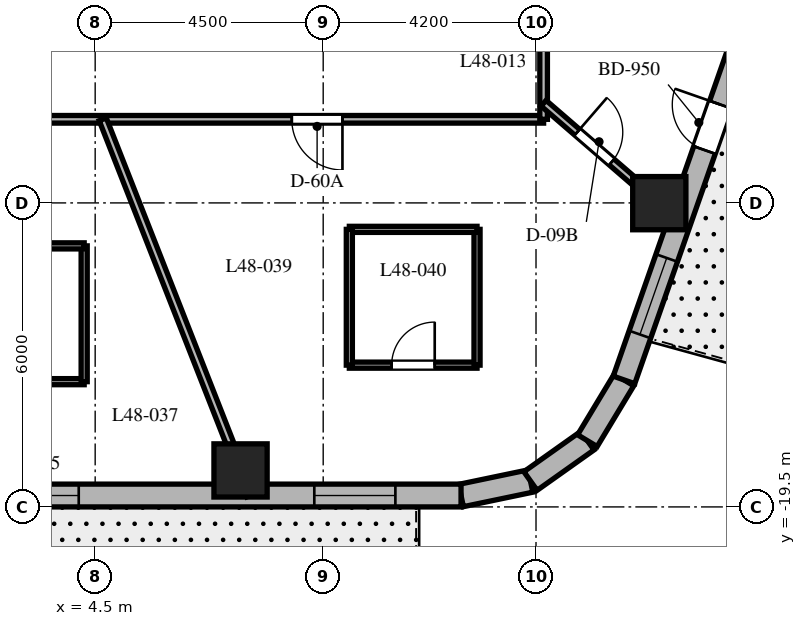
"""IFC4 building model, lengths in metres.
Left out: names, types, materials, properties, quantities, classifications, styles, units other than length and angle.
Written with IfcOpenShell. Run it as: python <this file> out.ifc"""

import sys

from ifc_helpers import new_model, si_unit, direction, frame, frame_2d, origin, origin_2d, place, context, subcontext, project, spatial, rectangle, extrude, element, fill, save


model = new_model("IFC4")
c1 = context("Model", 3, precision=1e-05, world=origin(), true_north=direction((0.0, 1.0)))
c2 = subcontext(c1, "Body", "Model", "MODEL_VIEW")
j1 = project(units=[si_unit("LENGTHUNIT", "METRE"), si_unit("PLANEANGLEUNIT", "RADIAN")], contexts=[c1])
p1 = place(None, origin())
s1 = spatial("IfcSite", under=j1, at=p1, CompositionType="ELEMENT")
p2 = place(p1, origin())
s2 = spatial("IfcBuilding", under=s1, at=p2, CompositionType="ELEMENT")
p3 = place(p2, frame((0.0, 0.0, 194.1)))
s3 = spatial("IfcBuildingStorey", under=s2, at=p3, CompositionType="ELEMENT", Elevation=194.1)
for number, where, z_axis, x_axis in (
    (1, (7.369, -18.78, 0.0), (0.0, 0.0, 1.0), (1.0, 0.0, 0.0)),
    (2, (15.633, -13.505, 0.0), (0.0, 0.0, 1.0), (1.0, 0.0, 0.0)),
):
    element("IfcColumn", number, at=place(p3, frame(where, z_axis=z_axis, x_axis=x_axis)), inside=s3, PredefinedType="COLUMN", context=c2, shape_type="SweptSolid", body=[
        extrude(rectangle(XDim=1.05, YDim=1.05, at=origin_2d()), origin(), (0.0, 0.0, 1.0), 3.7),
    ])
p4 = place(p3, frame((11.72, -19.275, 0.0), z_axis=(0.0, 0.0, 1.0), x_axis=(0.97893106758, 0.204191001093, 0.0)))
e3 = element("IfcWall", 3, at=p4, inside=s3, PredefinedType="SOLIDWALL", context=c2, shape_type="SweptSolid", body=[
    extrude(rectangle(XDim=1.4, YDim=0.45, at=frame_2d((0.7, 0.0))), origin(), (0.0, 0.0, 1.0), 3.4),
])
p5 = place(p3, frame((13.091, -18.989, 0.0), z_axis=(0.0, 0.0, 1.0), x_axis=(0.815574637848, 0.578651890258, 0.0)))
e4 = element("IfcWall", 4, at=p5, inside=s3, PredefinedType="SOLIDWALL", context=c2, shape_type="SweptSolid", body=[
    extrude(rectangle(XDim=1.377, YDim=0.45, at=frame_2d((0.688, 0.0))), origin(), (0.0, 0.0, 1.0), 3.4),
])
p6 = place(p3, frame((14.214, -18.192, 0.0), z_axis=(0.0, 0.0, 1.0), x_axis=(0.516340945502, 0.856383108193, 0.0)))
e5 = element("IfcWall", 5, at=p6, inside=s3, PredefinedType="SOLIDWALL", context=c2, shape_type="SweptSolid", body=[
    extrude(rectangle(XDim=1.4, YDim=0.45, at=frame_2d((0.7, 0.0))), origin(), (0.0, 0.0, 1.0), 3.4),
])
p7 = place(p3, frame((-10.108, -19.275, 0.0), z_axis=(0.0, 0.0, 1.0), x_axis=(1.0, 0.0, 0.0)))
e6 = element("IfcWall", 6, at=p7, inside=s3, PredefinedType="SOLIDWALL", context=c2, shape_type="SweptSolid", body=[
    extrude(rectangle(XDim=21.829, YDim=0.45, at=frame_2d((10.915, 0.0))), origin(), (0.0, 0.0, 1.0), 3.4),
])
p8 = place(p7, frame((5.503, 0.0, 0.0)))
e7 = element("IfcOpeningElement", 7, at=p8, cuts=e6, PredefinedType="OPENING", context=c2, shape_type="SweptSolid", body=[
    extrude(rectangle(XDim=1.0, YDim=2.15, at=frame_2d((0.5, 1.075))), frame((0.0, 0.235, 0.0), z_axis=(0.0, -1.0, 0.0), x_axis=(1.0, 0.0, 0.0)), (0.0, 0.0, 1.0), 0.47),
])
p9 = place(p7, frame((1.297, 0.0, 0.8)))
e8 = element("IfcOpeningElement", 8, at=p9, cuts=e6, PredefinedType="OPENING", context=c2, shape_type="SweptSolid", body=[
    extrude(rectangle(XDim=1.6, YDim=1.75, at=frame_2d((0.8, 0.875))), frame((0.0, 0.235, 0.0), z_axis=(0.0, -1.0, 0.0), x_axis=(1.0, 0.0, 0.0)), (0.0, 0.0, 1.0), 0.47),
])
p10 = place(p7, frame((7.402, 0.0, 0.8)))
e9 = element("IfcOpeningElement", 9, at=p10, cuts=e6, PredefinedType="OPENING", context=c2, shape_type="SweptSolid", body=[
    extrude(rectangle(XDim=1.6, YDim=1.75, at=frame_2d((0.8, 0.875))), frame((0.0, 0.235, 0.0), z_axis=(0.0, -1.0, 0.0), x_axis=(1.0, 0.0, 0.0)), (0.0, 0.0, 1.0), 0.47),
])
p11 = place(p7, frame((12.684, 0.0, 0.8)))
e10 = element("IfcOpeningElement", 10, at=p11, cuts=e6, PredefinedType="OPENING", context=c2, shape_type="SweptSolid", body=[
    extrude(rectangle(XDim=1.6, YDim=1.75, at=frame_2d((0.8, 0.875))), frame((0.0, 0.235, 0.0), z_axis=(0.0, -1.0, 0.0), x_axis=(1.0, 0.0, 0.0)), (0.0, 0.0, 1.0), 0.47),
])
p12 = place(p7, frame((18.933, 0.0, 0.8)))
e11 = element("IfcOpeningElement", 11, at=p12, cuts=e6, PredefinedType="OPENING", context=c2, shape_type="SweptSolid", body=[
    extrude(rectangle(XDim=1.6, YDim=1.75, at=frame_2d((0.8, 0.875))), frame((0.0, 0.235, 0.0), z_axis=(0.0, -1.0, 0.0), x_axis=(1.0, 0.0, 0.0)), (0.0, 0.0, 1.0), 0.47),
])
p13 = place(p3, frame((14.937, -16.993, 0.0), z_axis=(0.0, 0.0, 1.0), x_axis=(0.330431575061, 0.943829949834, 0.0)))
e12 = element("IfcWall", 12, at=p13, inside=s3, PredefinedType="SOLIDWALL", context=c2, shape_type="SweptSolid", body=[
    extrude(rectangle(XDim=17.689, YDim=0.45, at=frame_2d((8.844, 0.0))), origin(), (0.0, 0.0, 1.0), 3.4),
])
p14 = place(p13, frame((4.807, 0.0, 0.0)))
e13 = element("IfcOpeningElement", 13, at=p14, cuts=e12, PredefinedType="OPENING", context=c2, shape_type="SweptSolid", body=[
    extrude(rectangle(XDim=0.95, YDim=2.15, at=frame_2d((0.475, 1.075))), frame((0.0, 0.235, 0.0), z_axis=(0.0, -1.0, 0.0), x_axis=(1.0, 0.0, 0.0)), (0.0, 0.0, 1.0), 0.47),
])
p15 = place(p13, frame((0.95, 0.0, 0.8)))
e14 = element("IfcOpeningElement", 14, at=p15, cuts=e12, PredefinedType="OPENING", context=c2, shape_type="SweptSolid", body=[
    extrude(rectangle(XDim=1.6, YDim=1.75, at=frame_2d((0.8, 0.875))), frame((0.0, 0.235, 0.0), z_axis=(0.0, -1.0, 0.0), x_axis=(1.0, 0.0, 0.0)), (0.0, 0.0, 1.0), 0.47),
])
p16 = place(p13, frame((7.99, 0.0, 0.8)))
e15 = element("IfcOpeningElement", 15, at=p16, cuts=e12, PredefinedType="OPENING", context=c2, shape_type="SweptSolid", body=[
    extrude(rectangle(XDim=1.6, YDim=1.75, at=frame_2d((0.8, 0.875))), frame((0.0, 0.235, 0.0), z_axis=(0.0, -1.0, 0.0), x_axis=(1.0, 0.0, 0.0)), (0.0, 0.0, 1.0), 0.47),
])
p17 = place(p13, frame((15.084, 0.0, 0.8)))
e16 = element("IfcOpeningElement", 16, at=p17, cuts=e12, PredefinedType="OPENING", context=c2, shape_type="SweptSolid", body=[
    extrude(rectangle(XDim=1.6, YDim=1.75, at=frame_2d((0.8, 0.875))), frame((0.0, 0.235, 0.0), z_axis=(0.0, -1.0, 0.0), x_axis=(1.0, 0.0, 0.0)), (0.0, 0.0, 1.0), 0.47),
])
p18 = place(p3, frame((13.35, -11.85, 0.0), z_axis=(0.0, 0.0, 1.0), x_axis=(-1.0, 0.0, 0.0)))
e17 = element("IfcWall", 17, at=p18, inside=s3, PredefinedType="PARTITIONING", context=c2, shape_type="SweptSolid", body=[
    extrude(rectangle(XDim=26.7, YDim=0.15, at=frame_2d((13.35, 0.0))), origin(), (0.0, 0.0, 1.0), 2.84),
])
p19 = place(p18, frame((20.682, 0.0, 0.0)))
e18 = element("IfcOpeningElement", 18, at=p19, cuts=e17, PredefinedType="OPENING", context=c2, shape_type="SweptSolid", body=[
    extrude(rectangle(XDim=0.95, YDim=2.03, at=frame_2d((0.475, 1.015))), frame((0.0, 0.085, 0.0), z_axis=(0.0, -1.0, 0.0), x_axis=(1.0, 0.0, 0.0)), (0.0, 0.0, 1.0), 0.17),
])
p20 = place(p18, frame((14.708, 0.0, 0.0)))
e19 = element("IfcOpeningElement", 19, at=p20, cuts=e17, PredefinedType="OPENING", context=c2, shape_type="SweptSolid", body=[
    extrude(rectangle(XDim=0.95, YDim=2.03, at=frame_2d((0.475, 1.015))), frame((0.0, 0.085, 0.0), z_axis=(0.0, -1.0, 0.0), x_axis=(1.0, 0.0, 0.0)), (0.0, 0.0, 1.0), 0.17),
])
p21 = place(p18, frame((10.553, 0.0, 0.0)))
e20 = element("IfcOpeningElement", 20, at=p21, cuts=e17, PredefinedType="OPENING", context=c2, shape_type="SweptSolid", body=[
    extrude(rectangle(XDim=0.95, YDim=2.03, at=frame_2d((0.475, 1.015))), frame((0.0, 0.085, 0.0), z_axis=(0.0, -1.0, 0.0), x_axis=(1.0, 0.0, 0.0)), (0.0, 0.0, 1.0), 0.17),
])
p22 = place(p18, frame((3.97, 0.0, 0.0)))
e21 = element("IfcOpeningElement", 21, at=p22, cuts=e17, PredefinedType="OPENING", context=c2, shape_type="SweptSolid", body=[
    extrude(rectangle(XDim=1.0, YDim=2.03, at=frame_2d((0.5, 1.015))), frame((0.0, 0.085, 0.0), z_axis=(0.0, -1.0, 0.0), x_axis=(1.0, 0.0, 0.0)), (0.0, 0.0, 1.0), 0.17),
])
p23 = place(p3, frame((13.35, 11.85, 0.0), z_axis=(0.0, 0.0, 1.0), x_axis=(0.0, -1.0, 0.0)))
e22 = element("IfcWall", 22, at=p23, inside=s3, PredefinedType="PARTITIONING", context=c2, shape_type="SweptSolid", body=[
    extrude(rectangle(XDim=23.7, YDim=0.15, at=frame_2d((11.85, 0.0))), origin(), (0.0, 0.0, 1.0), 2.84),
])
p24 = place(p23, frame((9.424, 0.0, 0.0)))
e23 = element("IfcOpeningElement", 23, at=p24, cuts=e22, PredefinedType="OPENING", context=c2, shape_type="SweptSolid", body=[
    extrude(rectangle(XDim=0.95, YDim=2.03, at=frame_2d((0.475, 1.015))), frame((0.0, 0.085, 0.0), z_axis=(0.0, -1.0, 0.0), x_axis=(1.0, 0.0, 0.0)), (0.0, 0.0, 1.0), 0.17),
])
p25 = place(p23, frame((3.765, 0.0, 0.0)))
e24 = element("IfcOpeningElement", 24, at=p25, cuts=e22, PredefinedType="OPENING", context=c2, shape_type="SweptSolid", body=[
    extrude(rectangle(XDim=0.9, YDim=2.03, at=frame_2d((0.45, 1.015))), frame((0.0, 0.085, 0.0), z_axis=(0.0, -1.0, 0.0), x_axis=(1.0, 0.0, 0.0)), (0.0, 0.0, 1.0), 0.17),
])
p26 = place(p23, frame((12.494, 0.0, 0.0)))
e25 = element("IfcOpeningElement", 25, at=p26, cuts=e22, PredefinedType="OPENING", context=c2, shape_type="SweptSolid", body=[
    extrude(rectangle(XDim=0.9, YDim=2.03, at=frame_2d((0.45, 1.015))), frame((0.0, 0.085, 0.0), z_axis=(0.0, -1.0, 0.0), x_axis=(1.0, 0.0, 0.0)), (0.0, 0.0, 1.0), 0.17),
])
p27 = place(p3, frame((4.65, -11.85, 0.0), z_axis=(0.0, 0.0, 1.0), x_axis=(0.365265947993, -0.930903210456, 0.0)))
e26 = element("IfcWall", 26, at=p27, inside=s3, PredefinedType="PARTITIONING", context=c2, shape_type="SweptSolid", body=[
    extrude(rectangle(XDim=7.976, YDim=0.15, at=frame_2d((3.988, 0.0))), origin(), (0.0, 0.0, 1.0), 2.64),
])
p28 = place(p3, frame((13.35, -11.533, 0.0), z_axis=(0.0, 0.0, 1.0), x_axis=(0.756711647314, -0.65374879183, 0.0)))
e27 = element("IfcWall", 27, at=p28, inside=s3, PredefinedType="PARTITIONING", context=c2, shape_type="SweptSolid", body=[
    extrude(rectangle(XDim=3.55, YDim=0.15, at=frame_2d((1.775, 0.0))), origin(), (0.0, 0.0, 1.0), 2.64),
])
p29 = place(p28, frame((0.875, 0.0, 0.0)))
e28 = element("IfcOpeningElement", 28, at=p29, cuts=e27, PredefinedType="OPENING", context=c2, shape_type="SweptSolid", body=[
    extrude(rectangle(XDim=0.9, YDim=2.03, at=frame_2d((0.45, 1.015))), frame((0.0, 0.085, 0.0), z_axis=(0.0, -1.0, 0.0), x_axis=(1.0, 0.0, 0.0)), (0.0, 0.0, 1.0), 0.17),
])
p30 = place(p3, frame((1.763, -17.028, 0.0), z_axis=(0.0, 0.0, 1.0), x_axis=(1.0, 0.0, 0.0)))
e29 = element("IfcWall", 29, at=p30, inside=s3, PredefinedType="PARTITIONING", context=c2, shape_type="SweptSolid", body=[
    extrude(rectangle(XDim=2.52, YDim=0.12, at=frame_2d((1.26, 0.0))), origin(), (0.0, 0.0, 1.0), 3.4),
])
p31 = place(p30, frame((0.835, 0.0, 0.0)))
e30 = element("IfcOpeningElement", 30, at=p31, cuts=e29, PredefinedType="OPENING", context=c2, shape_type="SweptSolid", body=[
    extrude(rectangle(XDim=0.85, YDim=2.03, at=frame_2d((0.425, 1.015))), frame((0.0, 0.07, 0.0), z_axis=(0.0, -1.0, 0.0), x_axis=(1.0, 0.0, 0.0)), (0.0, 0.0, 1.0), 0.14),
])
p32 = place(p3, frame((4.283, -17.028, 0.0), z_axis=(0.0, 0.0, 1.0), x_axis=(0.0, 1.0, 0.0)))
e31 = element("IfcWall", 31, at=p32, inside=s3, PredefinedType="PARTITIONING", context=c2, shape_type="SweptSolid", body=[
    extrude(rectangle(XDim=2.68, YDim=0.12, at=frame_2d((1.34, 0.0))), origin(), (0.0, 0.0, 1.0), 2.84),
])
p33 = place(p3, frame((4.283, -14.348, 0.0), z_axis=(0.0, 0.0, 1.0), x_axis=(-1.0, 0.0, 0.0)))
e32 = element("IfcWall", 32, at=p33, inside=s3, PredefinedType="PARTITIONING", context=c2, shape_type="SweptSolid", body=[
    extrude(rectangle(XDim=2.52, YDim=0.12, at=frame_2d((1.26, 0.0))), origin(), (0.0, 0.0, 1.0), 3.4),
])
p34 = place(p3, frame((9.516, -16.702, 0.0), z_axis=(0.0, 0.0, 1.0), x_axis=(1.0, 0.0, 0.0)))
e33 = element("IfcWall", 33, at=p34, inside=s3, PredefinedType="PARTITIONING", context=c2, shape_type="SweptSolid", body=[
    extrude(rectangle(XDim=2.52, YDim=0.12, at=frame_2d((1.26, 0.0))), origin(), (0.0, 0.0, 1.0), 2.64),
])
p35 = place(p34, frame((0.835, 0.0, 0.0)))
e34 = element("IfcOpeningElement", 34, at=p35, cuts=e33, PredefinedType="OPENING", context=c2, shape_type="SweptSolid", body=[
    extrude(rectangle(XDim=0.85, YDim=2.03, at=frame_2d((0.425, 1.015))), frame((0.0, 0.07, 0.0), z_axis=(0.0, -1.0, 0.0), x_axis=(1.0, 0.0, 0.0)), (0.0, 0.0, 1.0), 0.14),
])
p36 = place(p3, frame((12.036, -16.702, 0.0), z_axis=(0.0, 0.0, 1.0), x_axis=(0.0, 1.0, 0.0)))
e35 = element("IfcWall", 35, at=p36, inside=s3, PredefinedType="PARTITIONING", context=c2, shape_type="SweptSolid", body=[
    extrude(rectangle(XDim=2.68, YDim=0.12, at=frame_2d((1.34, 0.0))), origin(), (0.0, 0.0, 1.0), 2.64),
])
p37 = place(p3, frame((12.036, -14.022, 0.0), z_axis=(0.0, 0.0, 1.0), x_axis=(-1.0, 0.0, 0.0)))
e36 = element("IfcWall", 36, at=p37, inside=s3, PredefinedType="PARTITIONING", context=c2, shape_type="SweptSolid", body=[
    extrude(rectangle(XDim=2.52, YDim=0.12, at=frame_2d((1.26, 0.0))), origin(), (0.0, 0.0, 1.0), 2.927),
])
p38 = place(p3, frame((9.516, -14.022, 0.0), z_axis=(0.0, 0.0, 1.0), x_axis=(0.0, -1.0, 0.0)))
e37 = element("IfcWall", 37, at=p38, inside=s3, PredefinedType="PARTITIONING", context=c2, shape_type="SweptSolid", body=[
    extrude(rectangle(XDim=2.68, YDim=0.12, at=frame_2d((1.34, 0.0))), origin(), (0.0, 0.0, 1.0), 2.927),
])
p39 = place(p11, origin())
e38 = element("IfcWindow", 38, at=p39, inside=s3, PartitioningType="SINGLE_PANEL", PredefinedType="WINDOW", context=c2, shape_type="SweptSolid", body=[
    extrude(rectangle(XDim=1.6, YDim=1.75, at=frame_2d((0.8, 0.875))), frame((0.0, 0.03, 0.0), z_axis=(0.0, -1.0, 0.0), x_axis=(1.0, 0.0, 0.0)), (0.0, 0.0, 1.0), 0.06),
])
fill(e10, e38)
p40 = place(p12, origin())
e39 = element("IfcWindow", 39, at=p40, inside=s3, PartitioningType="SINGLE_PANEL", PredefinedType="WINDOW", context=c2, shape_type="SweptSolid", body=[
    extrude(rectangle(XDim=1.6, YDim=1.75, at=frame_2d((0.8, 0.875))), frame((0.0, 0.03, 0.0), z_axis=(0.0, -1.0, 0.0), x_axis=(1.0, 0.0, 0.0)), (0.0, 0.0, 1.0), 0.06),
])
fill(e11, e39)
p41 = place(p14, origin())
e40 = element("IfcDoor", 40, at=p41, inside=s3, OperationType="SINGLE_SWING_RIGHT", PredefinedType="DOOR", context=c2, shape_type="SweptSolid", body=[
    extrude(rectangle(XDim=0.95, YDim=2.15, at=frame_2d((0.475, 1.075))), frame((0.0, 0.025, 0.0), z_axis=(0.0, -1.0, 0.0), x_axis=(1.0, 0.0, 0.0)), (0.0, 0.0, 1.0), 0.05),
])
fill(e13, e40)
p42 = place(p15, origin())
e41 = element("IfcWindow", 41, at=p42, inside=s3, PartitioningType="SINGLE_PANEL", PredefinedType="WINDOW", context=c2, shape_type="SweptSolid", body=[
    extrude(rectangle(XDim=1.6, YDim=1.75, at=frame_2d((0.8, 0.875))), frame((0.0, 0.03, 0.0), z_axis=(0.0, -1.0, 0.0), x_axis=(1.0, 0.0, 0.0)), (0.0, 0.0, 1.0), 0.06),
])
fill(e14, e41)
p43 = place(p22, origin())
e42 = element("IfcDoor", 42, at=p43, inside=s3, OperationType="SINGLE_SWING_LEFT", PredefinedType="DOOR", context=c2, shape_type="SweptSolid", body=[
    extrude(rectangle(XDim=1.0, YDim=2.03, at=frame_2d((0.5, 1.015))), frame((0.0, 0.025, 0.0), z_axis=(0.0, -1.0, 0.0), x_axis=(1.0, 0.0, 0.0)), (0.0, 0.0, 1.0), 0.05),
])
fill(e21, e42)
p44 = place(p29, origin())
e43 = element("IfcDoor", 43, at=p44, inside=s3, OperationType="SINGLE_SWING_LEFT", PredefinedType="DOOR", context=c2, shape_type="SweptSolid", body=[
    extrude(rectangle(XDim=0.9, YDim=2.03, at=frame_2d((0.45, 1.015))), frame((0.0, 0.025, 0.0), z_axis=(0.0, -1.0, 0.0), x_axis=(1.0, 0.0, 0.0)), (0.0, 0.0, 1.0), 0.05),
])
fill(e28, e43)
p45 = place(p35, origin())
e44 = element("IfcDoor", 44, at=p45, inside=s3, OperationType="SINGLE_SWING_RIGHT", PredefinedType="DOOR", context=c2, shape_type="SweptSolid", body=[
    extrude(rectangle(XDim=0.85, YDim=2.03, at=frame_2d((0.425, 1.015))), frame((0.0, 0.025, 0.0), z_axis=(0.0, -1.0, 0.0), x_axis=(1.0, 0.0, 0.0)), (0.0, 0.0, 1.0), 0.05),
])
fill(e34, e44)
save(model, sys.argv[1])
